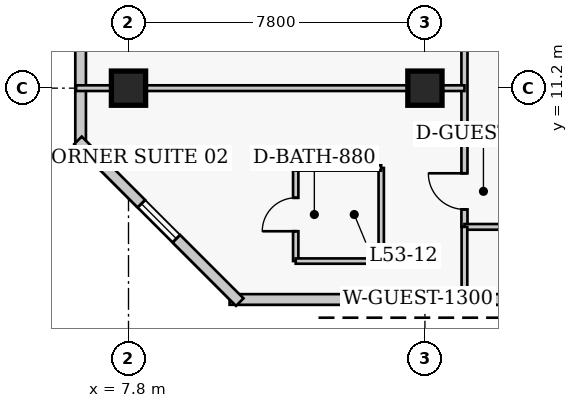
"""IFC4 building model, lengths in metres.
Left out: names, types, materials, properties, quantities, classifications, styles, units other than length and angle.
Written with IfcOpenShell. Run it as: python <this file> out.ifc"""

import sys

from ifc_helpers import new_model, si_unit, direction, frame, frame_2d, origin, origin_2d, place, context, subcontext, project, spatial, rectangle, extrude, element, fill, save


model = new_model("IFC4")
c1 = context("Model", 3, precision=1e-05, world=origin(), true_north=direction((0.0, 1.0)))
c2 = subcontext(c1, "Body", "Model", "MODEL_VIEW")
j1 = project(units=[si_unit("LENGTHUNIT", "METRE"), si_unit("PLANEANGLEUNIT", "RADIAN")], contexts=[c1])
p1 = place(None, origin())
s1 = spatial("IfcSite", under=j1, at=p1, CompositionType="ELEMENT")
p2 = place(p1, origin())
s2 = spatial("IfcBuilding", under=s1, at=p2, CompositionType="ELEMENT")
p3 = place(p2, frame((0.0, 0.0, 212.4)))
s3 = spatial("IfcBuildingStorey", under=s2, at=p3, CompositionType="ELEMENT", Elevation=212.4)
for number, where, z_axis, x_axis in (
    (1, (7.8, 11.2, 0.0), (0.0, 0.0, 1.0), (1.0, 0.0, 0.0)),
    (2, (15.6, 11.2, 0.0), (0.0, 0.0, 1.0), (1.0, 0.0, 0.0)),
):
    element("IfcColumn", number, at=place(p3, frame(where, z_axis=z_axis, x_axis=x_axis)), inside=s3, PredefinedType="COLUMN", context=c2, shape_type="SweptSolid", body=[
        extrude(rectangle(XDim=0.9, YDim=0.9, at=origin_2d()), origin(), (0.0, 0.0, 1.0), 3.9),
    ])
p4 = place(p3, frame((10.46, 5.64, 0.0), z_axis=(0.0, 0.0, 1.0), x_axis=(1.0, 0.0, 0.0)))
e3 = element("IfcWall", 3, at=p4, inside=s3, PredefinedType="SOLIDWALL", context=c2, shape_type="SweptSolid", body=[
    extrude(rectangle(XDim=25.83, YDim=0.28, at=frame_2d((12.915, 0.0))), origin(), (0.0, 0.0, 1.0), 3.65),
])
p5 = place(p4, frame((4.305, 0.0, 0.85)))
e4 = element("IfcOpeningElement", 4, at=p5, cuts=e3, PredefinedType="OPENING", context=c2, shape_type="SweptSolid", body=[
    extrude(rectangle(XDim=1.3, YDim=1.7, at=frame_2d((0.65, 0.85))), frame((0.0, 0.15, 0.0), z_axis=(0.0, -1.0, 0.0), x_axis=(1.0, 0.0, 0.0)), (0.0, 0.0, 1.0), 0.3),
])
p6 = place(p4, frame((11.615, 0.0, 0.85)))
e5 = element("IfcOpeningElement", 5, at=p6, cuts=e3, PredefinedType="OPENING", context=c2, shape_type="SweptSolid", body=[
    extrude(rectangle(XDim=1.3, YDim=1.7, at=frame_2d((0.65, 0.85))), frame((0.0, 0.15, 0.0), z_axis=(0.0, -1.0, 0.0), x_axis=(1.0, 0.0, 0.0)), (0.0, 0.0, 1.0), 0.3),
])
p7 = place(p4, frame((20.875, 0.0, 0.85)))
e6 = element("IfcOpeningElement", 6, at=p7, cuts=e3, PredefinedType="OPENING", context=c2, shape_type="SweptSolid", body=[
    extrude(rectangle(XDim=1.3, YDim=1.7, at=frame_2d((0.65, 0.85))), frame((0.0, 0.15, 0.0), z_axis=(0.0, -1.0, 0.0), x_axis=(1.0, 0.0, 0.0)), (0.0, 0.0, 1.0), 0.3),
])
p8 = place(p3, frame((6.54, 39.44, 0.0), z_axis=(0.0, 0.0, 1.0), x_axis=(0.0, -1.0, 0.0)))
e7 = element("IfcWall", 7, at=p8, inside=s3, PredefinedType="SOLIDWALL", context=c2, shape_type="SweptSolid", body=[
    extrude(rectangle(XDim=29.88, YDim=0.28, at=frame_2d((14.94, 0.0))), origin(), (0.0, 0.0, 1.0), 3.65),
])
p9 = place(p8, frame((2.435, 0.0, 0.85)))
e8 = element("IfcOpeningElement", 8, at=p9, cuts=e7, PredefinedType="OPENING", context=c2, shape_type="SweptSolid", body=[
    extrude(rectangle(XDim=1.3, YDim=1.7, at=frame_2d((0.65, 0.85))), frame((0.0, 0.15, 0.0), z_axis=(0.0, -1.0, 0.0), x_axis=(1.0, 0.0, 0.0)), (0.0, 0.0, 1.0), 0.3),
])
p10 = place(p8, frame((11.205, 0.0, 0.85)))
e9 = element("IfcOpeningElement", 9, at=p10, cuts=e7, PredefinedType="OPENING", context=c2, shape_type="SweptSolid", body=[
    extrude(rectangle(XDim=1.3, YDim=1.7, at=frame_2d((0.65, 0.85))), frame((0.0, 0.15, 0.0), z_axis=(0.0, -1.0, 0.0), x_axis=(1.0, 0.0, 0.0)), (0.0, 0.0, 1.0), 0.3),
])
p11 = place(p8, frame((17.375, 0.0, 0.85)))
e10 = element("IfcOpeningElement", 10, at=p11, cuts=e7, PredefinedType="OPENING", context=c2, shape_type="SweptSolid", body=[
    extrude(rectangle(XDim=1.3, YDim=1.7, at=frame_2d((0.65, 0.85))), frame((0.0, 0.15, 0.0), z_axis=(0.0, -1.0, 0.0), x_axis=(1.0, 0.0, 0.0)), (0.0, 0.0, 1.0), 0.3),
])
p12 = place(p8, frame((25.495, 0.0, 0.85)))
e11 = element("IfcOpeningElement", 11, at=p12, cuts=e7, PredefinedType="OPENING", context=c2, shape_type="SweptSolid", body=[
    extrude(rectangle(XDim=1.3, YDim=1.7, at=frame_2d((0.65, 0.85))), frame((0.0, 0.15, 0.0), z_axis=(0.0, -1.0, 0.0), x_axis=(1.0, 0.0, 0.0)), (0.0, 0.0, 1.0), 0.3),
])
p13 = place(p3, frame((6.471, 9.827, 0.0), z_axis=(0.0, 0.0, 1.0), x_axis=(0.707106781187, -0.707106781187, 0.0)))
e12 = element("IfcWall", 12, at=p13, inside=s3, PredefinedType="SOLIDWALL", context=c2, shape_type="SweptSolid", body=[
    extrude(rectangle(XDim=6.02, YDim=0.28, at=frame_2d((3.01, 0.0))), origin(), (0.0, 0.0, 1.0), 3.65),
])
p14 = place(p13, frame((2.36, 0.0, 0.85)))
e13 = element("IfcOpeningElement", 13, at=p14, cuts=e12, PredefinedType="OPENING", context=c2, shape_type="SweptSolid", body=[
    extrude(rectangle(XDim=1.3, YDim=1.7, at=frame_2d((0.65, 0.85))), frame((0.0, 0.15, 0.0), z_axis=(0.0, -1.0, 0.0), x_axis=(1.0, 0.0, 0.0)), (0.0, 0.0, 1.0), 0.3),
])
p15 = place(p3, frame((16.64, 7.55, 0.0), z_axis=(0.0, 0.0, 1.0), x_axis=(0.0, 1.0, 0.0)))
e14 = element("IfcWall", 14, at=p15, inside=s3, PredefinedType="PARTITIONING", context=c2, shape_type="SweptSolid", body=[
    extrude(rectangle(XDim=33.1, YDim=0.16, at=frame_2d((16.55, 0.0))), origin(), (0.0, 0.0, 1.0), 3.65),
])
p16 = place(p15, frame((0.46, 0.0, 0.0)))
e15 = element("IfcOpeningElement", 15, at=p16, cuts=e14, PredefinedType="OPENING", context=c2, shape_type="SweptSolid", body=[
    extrude(rectangle(XDim=0.95, YDim=2.1, at=frame_2d((0.475, 1.05))), frame((0.0, 0.09, 0.0), z_axis=(0.0, -1.0, 0.0), x_axis=(1.0, 0.0, 0.0)), (0.0, 0.0, 1.0), 0.18),
])
p17 = place(p15, frame((7.575, 0.0, 0.0)))
e16 = element("IfcOpeningElement", 16, at=p17, cuts=e14, PredefinedType="OPENING", context=c2, shape_type="SweptSolid", body=[
    extrude(rectangle(XDim=0.95, YDim=2.1, at=frame_2d((0.475, 1.05))), frame((0.0, 0.09, 0.0), z_axis=(0.0, -1.0, 0.0), x_axis=(1.0, 0.0, 0.0)), (0.0, 0.0, 1.0), 0.18),
])
p18 = place(p15, frame((14.178, 0.0, 0.0)))
e17 = element("IfcOpeningElement", 17, at=p18, cuts=e14, PredefinedType="OPENING", context=c2, shape_type="SweptSolid", body=[
    extrude(rectangle(XDim=0.95, YDim=2.1, at=frame_2d((0.475, 1.05))), frame((0.0, 0.09, 0.0), z_axis=(0.0, -1.0, 0.0), x_axis=(1.0, 0.0, 0.0)), (0.0, 0.0, 1.0), 0.18),
])
p19 = place(p15, frame((28.4, 0.0, 0.0)))
e18 = element("IfcOpeningElement", 18, at=p19, cuts=e14, PredefinedType="OPENING", context=c2, shape_type="SweptSolid", body=[
    extrude(rectangle(XDim=1.0, YDim=2.15, at=frame_2d((0.5, 1.075))), frame((0.0, 0.09, 0.0), z_axis=(0.0, -1.0, 0.0), x_axis=(1.0, 0.0, 0.0)), (0.0, 0.0, 1.0), 0.18),
])
p20 = place(p3, frame((16.64, 7.55, 0.0), z_axis=(0.0, 0.0, 1.0), x_axis=(1.0, 0.0, 0.0)))
e19 = element("IfcWall", 19, at=p20, inside=s3, PredefinedType="PARTITIONING", context=c2, shape_type="SweptSolid", body=[
    extrude(rectangle(XDim=2.22, YDim=0.15, at=frame_2d((1.11, 0.0))), origin(), (0.0, 0.0, 1.0), 3.65),
])
p21 = place(p3, frame((16.64, 5.52, 0.0), z_axis=(0.0, 0.0, 1.0), x_axis=(0.0, 1.0, 0.0)))
e20 = element("IfcWall", 20, at=p21, inside=s3, PredefinedType="PARTITIONING", context=c2, shape_type="SweptSolid", body=[
    extrude(rectangle(XDim=2.03, YDim=0.15, at=frame_2d((1.015, 0.0))), origin(), (0.0, 0.0, 1.0), 3.65),
])
p22 = place(p3, frame((12.2, 6.65, 0.0), z_axis=(0.0, 0.0, 1.0), x_axis=(0.0, 1.0, 0.0)))
e21 = element("IfcWall", 21, at=p22, inside=s3, PredefinedType="PLUMBINGWALL", context=c2, shape_type="SweptSolid", body=[
    extrude(rectangle(XDim=2.45, YDim=0.14, at=frame_2d((1.225, 0.0))), origin(), (0.0, 0.0, 1.0), 3.65),
])
p23 = place(p22, frame((0.785, 0.0, 0.0)))
e22 = element("IfcOpeningElement", 22, at=p23, cuts=e21, PredefinedType="OPENING", context=c2, shape_type="SweptSolid", body=[
    extrude(rectangle(XDim=0.88, YDim=2.05, at=frame_2d((0.44, 1.025))), frame((0.0, 0.08, 0.0), z_axis=(0.0, -1.0, 0.0), x_axis=(1.0, 0.0, 0.0)), (0.0, 0.0, 1.0), 0.16),
])
p24 = place(p3, frame((14.45, 6.65, 0.0), z_axis=(0.0, 0.0, 1.0), x_axis=(0.0, 1.0, 0.0)))
e23 = element("IfcWall", 23, at=p24, inside=s3, PredefinedType="PLUMBINGWALL", context=c2, shape_type="SweptSolid", body=[
    extrude(rectangle(XDim=2.45, YDim=0.14, at=frame_2d((1.225, 0.0))), origin(), (0.0, 0.0, 1.0), 3.65),
])
for number, where, z_axis, x_axis in (
    (24, (12.2, 6.65, 0.0), (0.0, 0.0, 1.0), (1.0, 0.0, 0.0)),
    (25, (12.2, 9.1, 0.0), (0.0, 0.0, 1.0), (1.0, 0.0, 0.0)),
):
    element("IfcWall", number, at=place(p3, frame(where, z_axis=z_axis, x_axis=x_axis)), inside=s3, PredefinedType="PLUMBINGWALL", context=c2, shape_type="SweptSolid", body=[
        extrude(rectangle(XDim=2.25, YDim=0.14, at=frame_2d((1.125, 0.0))), origin(), (0.0, 0.0, 1.0), 3.65),
    ])
p25 = place(p3, frame((6.42, 11.2, 0.0), z_axis=(0.0, 0.0, 1.0), x_axis=(1.0, 0.0, 0.0)))
e26 = element("IfcWall", 26, at=p25, inside=s3, PredefinedType="PARTITIONING", context=c2, shape_type="SweptSolid", body=[
    extrude(rectangle(XDim=10.22, YDim=0.15, at=frame_2d((5.11, 0.0))), origin(), (0.0, 0.0, 1.0), 2.878),
])
p26 = place(p5, origin())
e27 = element("IfcWindow", 27, at=p26, inside=s3, PartitioningType="SINGLE_PANEL", PredefinedType="WINDOW", context=c2, shape_type="SweptSolid", body=[
    extrude(rectangle(XDim=1.3, YDim=1.7, at=frame_2d((0.65, 0.85))), frame((0.0, 0.03, 0.0), z_axis=(0.0, -1.0, 0.0), x_axis=(1.0, 0.0, 0.0)), (0.0, 0.0, 1.0), 0.06),
])
fill(e4, e27)
p27 = place(p14, origin())
e28 = element("IfcWindow", 28, at=p27, inside=s3, PartitioningType="SINGLE_PANEL", PredefinedType="WINDOW", context=c2, shape_type="SweptSolid", body=[
    extrude(rectangle(XDim=1.3, YDim=1.7, at=frame_2d((0.65, 0.85))), frame((0.0, 0.03, 0.0), z_axis=(0.0, -1.0, 0.0), x_axis=(1.0, 0.0, 0.0)), (0.0, 0.0, 1.0), 0.06),
])
fill(e13, e28)
p28 = place(p23, origin())
e29 = element("IfcDoor", 29, at=p28, inside=s3, OperationType="SINGLE_SWING_LEFT", PredefinedType="DOOR", context=c2, shape_type="SweptSolid", body=[
    extrude(rectangle(XDim=0.88, YDim=2.05, at=frame_2d((0.44, 1.025))), frame((0.0, 0.025, 0.0), z_axis=(0.0, -1.0, 0.0), x_axis=(1.0, 0.0, 0.0)), (0.0, 0.0, 1.0), 0.05),
])
fill(e22, e29)
p29 = place(p16, origin())
e30 = element("IfcDoor", 30, at=p29, inside=s3, OperationType="SINGLE_SWING_RIGHT", PredefinedType="DOOR", context=c2, shape_type="SweptSolid", body=[
    extrude(rectangle(XDim=0.95, YDim=2.1, at=frame_2d((0.475, 1.05))), frame((0.0, 0.025, 0.0), z_axis=(0.0, -1.0, 0.0), x_axis=(1.0, 0.0, 0.0)), (0.0, 0.0, 1.0), 0.05),
])
fill(e15, e30)
save(model, sys.argv[1])
